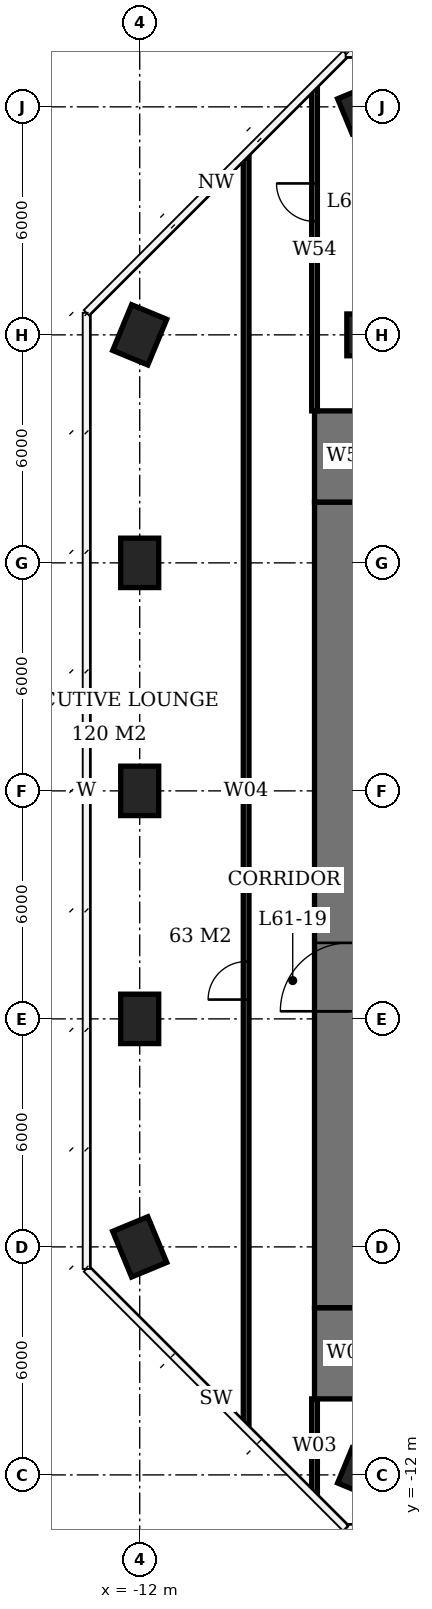
"""IFC4 building model, lengths in metres.
Left out: names, types, materials, properties, quantities, classifications, styles, units other than length and angle.
Written with IfcOpenShell. Run it as: python <this file> out.ifc"""

import sys

from ifc_helpers import new_model, si_unit, direction, frame, frame_2d, origin, origin_2d, place, context, subcontext, project, spatial, rectangle, extrude, element, fill, save


model = new_model("IFC4")
c1 = context("Model", 3, precision=1e-05, world=origin(), true_north=direction((0.0, 1.0)))
c2 = subcontext(c1, "Body", "Model", "MODEL_VIEW")
j1 = project(units=[si_unit("LENGTHUNIT", "METRE"), si_unit("PLANEANGLEUNIT", "RADIAN")], contexts=[c1])
p1 = place(None, origin())
s1 = spatial("IfcSite", under=j1, at=p1, CompositionType="ELEMENT")
p2 = place(p1, origin())
s2 = spatial("IfcBuilding", under=s1, at=p2, CompositionType="ELEMENT")
p3 = place(p2, frame((0.0, 0.0, 248.9)))
s3 = spatial("IfcBuildingStorey", under=s2, at=p3, CompositionType="ELEMENT", Elevation=248.9)
for number, where, z_axis, x_axis in (
    (1, (-12.0, -6.0, 0.0), (0.0, 0.0, 1.0), (-0.383, 0.924, 0.0)),
    (2, (-12.0, 0.0, 0.0), (0.0, 0.0, 1.0), (0.0, 1.0, 0.0)),
    (3, (-12.0, 6.0, 0.0), (0.0, 0.0, 1.0), (0.0, 1.0, 0.0)),
    (4, (-12.0, 12.0, 0.0), (0.0, 0.0, 1.0), (0.0, 1.0, 0.0)),
    (5, (-12.0, 18.0, 0.0), (0.0, 0.0, 1.0), (0.383, 0.924, 0.0)),
    (6, (-6.0, -12.0, 0.0), (0.0, 0.0, 1.0), (-0.924, 0.383, 0.0)),
):
    element("IfcColumn", number, at=place(p3, frame(where, z_axis=z_axis, x_axis=x_axis)), inside=s3, PredefinedType="COLUMN", context=c2, shape_type="SweptSolid", body=[
        extrude(rectangle(XDim=1.3, YDim=1.0, at=origin_2d()), origin(), (0.0, 0.0, 1.0), 3.9),
    ])
p4 = place(p3, frame((-6.0, 18.0, 0.0), z_axis=(0.0, 0.0, 1.0), x_axis=(1.0, 0.0, 0.0)))
e7 = element("IfcColumn", 7, at=p4, inside=s3, PredefinedType="COLUMN", context=c2, shape_type="SweptSolid", body=[
    extrude(rectangle(XDim=1.1, YDim=1.1, at=origin_2d()), origin(), (0.0, 0.0, 1.0), 3.9),
])
p5 = place(p3, frame((-6.0, 24.0, 0.0), z_axis=(0.0, 0.0, 1.0), x_axis=(0.923879532511, 0.382683432365, 0.0)))
e8 = element("IfcColumn", 8, at=p5, inside=s3, PredefinedType="COLUMN", context=c2, shape_type="SweptSolid", body=[
    extrude(rectangle(XDim=1.3, YDim=1.0, at=origin_2d()), origin(), (0.0, 0.0, 1.0), 3.9),
])
p6 = place(p3, frame((-6.5, -7.6, 0.0), z_axis=(0.0, 0.0, 1.0), x_axis=(0.0, 1.0, 0.0)))
e9 = element("IfcWall", 9, at=p6, inside=s3, PredefinedType="SHEAR", context=c2, shape_type="SweptSolid", body=[
    extrude(rectangle(XDim=21.2, YDim=1.8, at=frame_2d((10.6, 0.0))), origin(), (0.0, 0.0, 1.0), 3.9),
])
p7 = place(p6, frame((7.8, 0.0, 0.0)))
e10 = element("IfcOpeningElement", 10, at=p7, cuts=e9, PredefinedType="OPENING", context=c2, shape_type="SweptSolid", body=[
    extrude(rectangle(XDim=1.8, YDim=2.4, at=frame_2d((0.9, 1.2))), frame((0.0, 0.91, 0.0), z_axis=(0.0, -1.0, 0.0), x_axis=(1.0, 0.0, 0.0)), (0.0, 0.0, 1.0), 1.82),
])
for number, where, z_axis, x_axis in (
    (11, (-6.5, -10.0, 0.0), (0.0, 0.0, 1.0), (0.0, 1.0, 0.0)),
    (12, (-6.5, 13.6, 0.0), (0.0, 0.0, 1.0), (0.0, 1.0, 0.0)),
):
    element("IfcWall", number, at=place(p3, frame(where, z_axis=z_axis, x_axis=x_axis)), inside=s3, PredefinedType="SHEAR", context=c2, shape_type="SweptSolid", body=[
        extrude(rectangle(XDim=2.4, YDim=1.8, at=frame_2d((1.2, 0.0))), origin(), (0.0, 0.0, 1.0), 3.9),
    ])
p8 = place(p3, frame((-9.2, -10.664, 0.0), z_axis=(0.0, 0.0, 1.0), x_axis=(0.0, 1.0, 0.0)))
e13 = element("IfcWall", 13, at=p8, inside=s3, PredefinedType="PARTITIONING", context=c2, shape_type="SweptSolid", body=[
    extrude(rectangle(XDim=33.328, YDim=0.15, at=frame_2d((16.664, 0.0))), origin(), (0.0, 0.0, 1.0), 3.65),
])
p9 = place(p8, frame((11.172, 0.0, 0.0)))
e14 = element("IfcOpeningElement", 14, at=p9, cuts=e13, PredefinedType="OPENING", context=c2, shape_type="SweptSolid", body=[
    extrude(rectangle(XDim=1.0, YDim=2.4, at=frame_2d((0.5, 1.2))), frame((0.0, 0.085, 0.0), z_axis=(0.0, -1.0, 0.0), x_axis=(1.0, 0.0, 0.0)), (0.0, 0.0, 1.0), 0.17),
])
p10 = place(p3, frame((-7.4, -12.464, 0.0), z_axis=(0.0, 0.0, 1.0), x_axis=(0.0, 1.0, 0.0)))
e15 = element("IfcWall", 15, at=p10, inside=s3, PredefinedType="PARTITIONING", context=c2, shape_type="SweptSolid", body=[
    extrude(rectangle(XDim=2.464, YDim=0.15, at=frame_2d((1.232, 0.0))), origin(), (0.0, 0.0, 1.0), 3.65),
])
p11 = place(p3, frame((-7.4, 16.0, 0.0), z_axis=(0.0, 0.0, 1.0), x_axis=(0.0, 1.0, 0.0)))
e16 = element("IfcWall", 16, at=p11, inside=s3, PredefinedType="PARTITIONING", context=c2, shape_type="SweptSolid", body=[
    extrude(rectangle(XDim=8.464, YDim=0.15, at=frame_2d((4.232, 0.0))), origin(), (0.0, 0.0, 1.0), 3.65),
])
p12 = place(p11, frame((4.985, 0.0, 0.0)))
e17 = element("IfcOpeningElement", 17, at=p12, cuts=e16, PredefinedType="OPENING", context=c2, shape_type="SweptSolid", body=[
    extrude(rectangle(XDim=1.0, YDim=2.4, at=frame_2d((0.5, 1.2))), frame((0.0, 0.085, 0.0), z_axis=(0.0, -1.0, 0.0), x_axis=(1.0, 0.0, 0.0)), (0.0, 0.0, 1.0), 0.17),
])
p13 = place(p7, origin())
e18 = element("IfcDoor", 18, at=p13, inside=s3, OperationType="DOUBLE_DOOR_SINGLE_SWING", PredefinedType="DOOR", context=c2, shape_type="SweptSolid", body=[
    extrude(rectangle(XDim=1.8, YDim=2.4, at=frame_2d((0.9, 1.2))), frame((0.0, 0.025, 0.0), z_axis=(0.0, -1.0, 0.0), x_axis=(1.0, 0.0, 0.0)), (0.0, 0.0, 1.0), 0.05),
])
fill(e10, e18)
p14 = place(p9, origin())
e19 = element("IfcDoor", 19, at=p14, inside=s3, OperationType="SINGLE_SWING_LEFT", PredefinedType="DOOR", context=c2, shape_type="SweptSolid", body=[
    extrude(rectangle(XDim=1.0, YDim=2.4, at=frame_2d((0.5, 1.2))), frame((0.0, 0.025, 0.0), z_axis=(0.0, -1.0, 0.0), x_axis=(1.0, 0.0, 0.0)), (0.0, 0.0, 1.0), 0.05),
])
fill(e14, e19)
p15 = place(p12, origin())
e20 = element("IfcDoor", 20, at=p15, inside=s3, OperationType="SINGLE_SWING_RIGHT", PredefinedType="DOOR", context=c2, shape_type="SweptSolid", body=[
    extrude(rectangle(XDim=1.0, YDim=2.4, at=frame_2d((0.5, 1.2))), frame((0.0, 0.025, 0.0), z_axis=(0.0, -1.0, 0.0), x_axis=(1.0, 0.0, 0.0)), (0.0, 0.0, 1.0), 0.05),
])
fill(e17, e20)
save(model, sys.argv[1])
